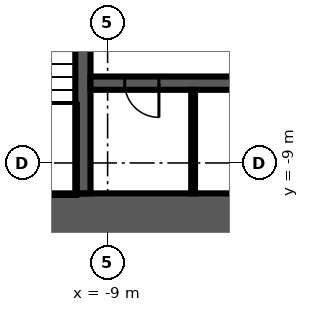
"""IFC4 building model, lengths in metres.
Left out: names, types, materials, properties, quantities, classifications, styles, units other than length and angle.
Written with IfcOpenShell. Run it as: python <this file> out.ifc"""

import sys

from ifc_helpers import new_model, si_unit, direction, frame, frame_2d, origin, place, context, subcontext, project, spatial, rectangle, extrude, element, fill, save


model = new_model("IFC4")
c1 = context("Model", 3, precision=1e-05, world=origin(), true_north=direction((0.0, 1.0)))
c2 = subcontext(c1, "Body", "Model", "MODEL_VIEW")
j1 = project(units=[si_unit("LENGTHUNIT", "METRE"), si_unit("PLANEANGLEUNIT", "RADIAN")], contexts=[c1])
p1 = place(None, origin())
s1 = spatial("IfcSite", under=j1, at=p1, CompositionType="ELEMENT")
p2 = place(p1, origin())
s2 = spatial("IfcBuilding", under=s1, at=p2, CompositionType="ELEMENT")
p3 = place(p2, origin())
s3 = spatial("IfcBuildingStorey", under=s2, at=p3, CompositionType="ELEMENT", Elevation=0.0)
p4 = place(p3, frame((14.0, -10.4, 0.0), z_axis=(0.0, 0.0, 1.0), x_axis=(-1.0, 0.0, 0.0)))
e1 = element("IfcWall", 1, at=p4, inside=s3, PredefinedType="SHEAR", context=c2, shape_type="SweptSolid", body=[
    extrude(rectangle(XDim=28.0, YDim=1.2, at=frame_2d((14.0, 0.0))), origin(), (0.0, 0.0, 1.0), 8.55),
])
p5 = place(p4, frame((5.1, 0.0, 0.0)))
e2 = element("IfcOpeningElement", 2, at=p5, cuts=e1, PredefinedType="OPENING", context=c2, shape_type="SweptSolid", body=[
    extrude(rectangle(XDim=1.6, YDim=2.1, at=frame_2d((0.8, 1.05))), frame((0.0, 0.61, 0.0), z_axis=(0.0, -1.0, 0.0), x_axis=(1.0, 0.0, 0.0)), (0.0, 0.0, 1.0), 1.22),
])
p6 = place(p3, frame((-9.65, -9.8, 0.0), z_axis=(0.0, 0.0, 1.0), x_axis=(0.0, 1.0, 0.0)))
e3 = element("IfcWall", 3, at=p6, inside=s3, PredefinedType="SHEAR", context=c2, shape_type="SweptSolid", body=[
    extrude(rectangle(XDim=7.5, YDim=0.4, at=frame_2d((3.75, 0.0))), origin(), (0.0, 0.0, 1.0), 8.55),
])
p7 = place(p6, frame((5.1, 0.0, 0.0)))
e4 = element("IfcOpeningElement", 4, at=p7, cuts=e3, PredefinedType="OPENING", context=c2, shape_type="SweptSolid", body=[
    extrude(rectangle(XDim=1.2, YDim=2.1, at=frame_2d((0.6, 1.05))), frame((0.0, 0.21, 0.0), z_axis=(0.0, -1.0, 0.0), x_axis=(1.0, 0.0, 0.0)), (0.0, 0.0, 1.0), 0.42),
])
p8 = place(p3, frame((9.45, -6.9, 0.0), z_axis=(0.0, 0.0, 1.0), x_axis=(-1.0, 0.0, 0.0)))
e5 = element("IfcWall", 5, at=p8, inside=s3, PredefinedType="SHEAR", context=c2, shape_type="SweptSolid", body=[
    extrude(rectangle(XDim=18.9, YDim=0.35, at=frame_2d((9.45, 0.0))), origin(), (0.0, 0.0, 1.0), 8.55),
])
p9 = place(p8, frame((6.2, 0.0, 0.0)))
e6 = element("IfcOpeningElement", 6, at=p9, cuts=e5, PredefinedType="OPENING", context=c2, shape_type="SweptSolid", body=[
    extrude(rectangle(XDim=1.1, YDim=2.1, at=frame_2d((0.55, 1.05))), frame((0.0, 0.185, 0.0), z_axis=(0.0, -1.0, 0.0), x_axis=(1.0, 0.0, 0.0)), (0.0, 0.0, 1.0), 0.37),
])
p10 = place(p8, frame((3.5, 0.0, 0.0)))
e7 = element("IfcOpeningElement", 7, at=p10, cuts=e5, PredefinedType="OPENING", context=c2, shape_type="SweptSolid", body=[
    extrude(rectangle(XDim=1.1, YDim=2.1, at=frame_2d((0.55, 1.05))), frame((0.0, 0.185, 0.0), z_axis=(0.0, -1.0, 0.0), x_axis=(1.0, 0.0, 0.0)), (0.0, 0.0, 1.0), 0.37),
])
p11 = place(p8, frame((0.75, 0.0, 0.0)))
e8 = element("IfcOpeningElement", 8, at=p11, cuts=e5, PredefinedType="OPENING", context=c2, shape_type="SweptSolid", body=[
    extrude(rectangle(XDim=1.2, YDim=2.1, at=frame_2d((0.6, 1.05))), frame((0.0, 0.185, 0.0), z_axis=(0.0, -1.0, 0.0), x_axis=(1.0, 0.0, 0.0)), (0.0, 0.0, 1.0), 0.37),
])
p12 = place(p8, frame((17.1, 0.0, 0.0)))
e9 = element("IfcOpeningElement", 9, at=p12, cuts=e5, PredefinedType="OPENING", context=c2, shape_type="SweptSolid", body=[
    extrude(rectangle(XDim=0.9, YDim=2.1, at=frame_2d((0.45, 1.05))), frame((0.0, 0.185, 0.0), z_axis=(0.0, -1.0, 0.0), x_axis=(1.0, 0.0, 0.0)), (0.0, 0.0, 1.0), 0.37),
])
p13 = place(p8, frame((13.05, 0.0, 0.0)))
e10 = element("IfcOpeningElement", 10, at=p13, cuts=e5, PredefinedType="OPENING", context=c2, shape_type="SweptSolid", body=[
    extrude(rectangle(XDim=0.9, YDim=2.1, at=frame_2d((0.45, 1.05))), frame((0.0, 0.185, 0.0), z_axis=(0.0, -1.0, 0.0), x_axis=(1.0, 0.0, 0.0)), (0.0, 0.0, 1.0), 0.37),
])
p14 = place(p8, frame((9.0, 0.0, 0.0)))
e11 = element("IfcOpeningElement", 11, at=p14, cuts=e5, PredefinedType="OPENING", context=c2, shape_type="SweptSolid", body=[
    extrude(rectangle(XDim=0.9, YDim=2.1, at=frame_2d((0.45, 1.05))), frame((0.0, 0.185, 0.0), z_axis=(0.0, -1.0, 0.0), x_axis=(1.0, 0.0, 0.0)), (0.0, 0.0, 1.0), 0.37),
])
p15 = place(p3, frame((-6.75, -9.8, 0.0), z_axis=(0.0, 0.0, 1.0), x_axis=(0.0, 1.0, 0.0)))
e12 = element("IfcWall", 12, at=p15, inside=s3, PredefinedType="PARTITIONING", context=c2, shape_type="SweptSolid", body=[
    extrude(rectangle(XDim=2.725, YDim=0.1, at=frame_2d((1.363, 0.0))), origin(), (0.0, 0.0, 1.0), 8.55),
])
p16 = place(p12, origin())
e13 = element("IfcDoor", 13, at=p16, inside=s3, OperationType="SINGLE_SWING_RIGHT", PredefinedType="DOOR", context=c2, shape_type="SweptSolid", body=[
    extrude(rectangle(XDim=0.9, YDim=2.1, at=frame_2d((0.45, 1.05))), frame((0.0, 0.025, 0.0), z_axis=(0.0, -1.0, 0.0), x_axis=(1.0, 0.0, 0.0)), (0.0, 0.0, 1.0), 0.05),
])
fill(e9, e13)
save(model, sys.argv[1])
